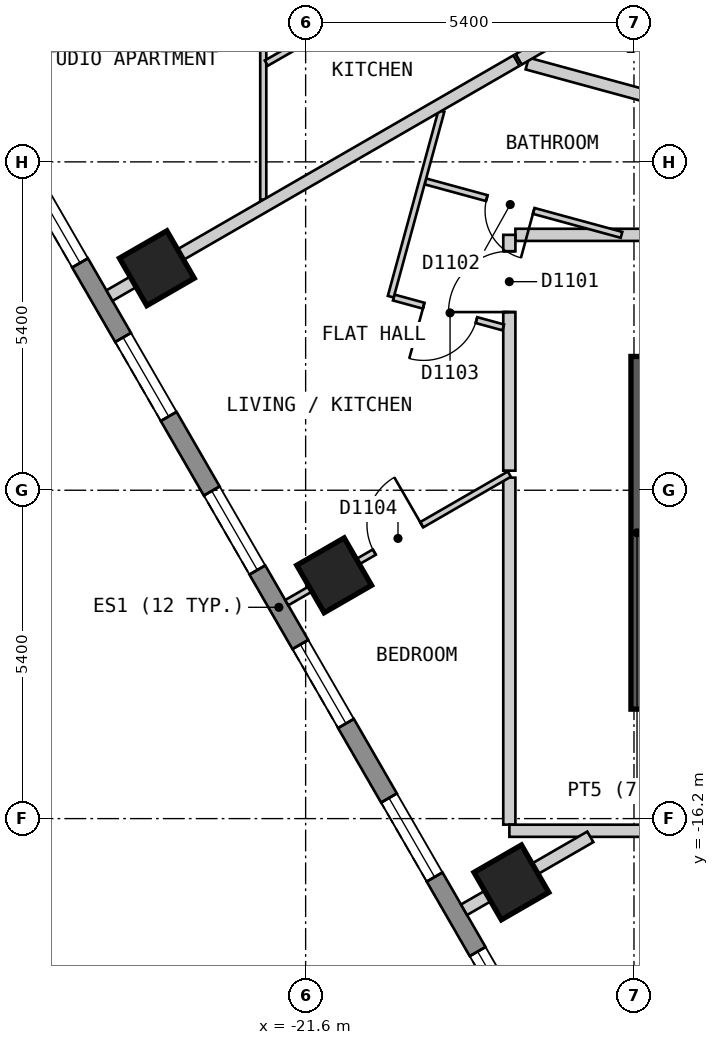
"""IFC4 building model, lengths in metres.
Left out: names, types, materials, properties, quantities, classifications, styles, units other than length and angle.
Written with IfcOpenShell. Run it as: python <this file> out.ifc"""

import sys

from ifc_helpers import new_model, si_unit, direction, frame, frame_2d, origin, origin_2d, place, context, subcontext, project, spatial, polyline, rectangle, outline, extrude, element, fill, save


model = new_model("IFC4")
c1 = context("Model", 3, precision=1e-05, world=origin(), true_north=direction((0.0, 1.0)))
c2 = subcontext(c1, "Body", "Model", "MODEL_VIEW")
j1 = project(units=[si_unit("LENGTHUNIT", "METRE"), si_unit("PLANEANGLEUNIT", "RADIAN")], contexts=[c1])
p1 = place(None, origin())
s1 = spatial("IfcSite", under=j1, at=p1, CompositionType="ELEMENT")
p2 = place(p1, origin())
s2 = spatial("IfcBuilding", under=s1, at=p2, CompositionType="ELEMENT")
p3 = place(p2, frame((0.0, 0.0, 150.6)))
s3 = spatial("IfcBuildingStorey", under=s2, at=p3, CompositionType="ELEMENT", Elevation=150.6)
for number, where, z_axis, x_axis in (
    (1, (-24.047, -7.149, 0.0), (0.0, 0.0, 1.0), (0.5, -0.866, 0.0)),
    (2, (-21.131, -12.199, 0.0), (0.0, 0.0, 1.0), (0.5, -0.866, 0.0)),
    (3, (-18.216, -17.249, 0.0), (0.0, 0.0, 1.0), (0.5, -0.866, 0.0)),
):
    element("IfcColumn", number, at=place(p3, frame(where, z_axis=z_axis, x_axis=x_axis)), inside=s3, PredefinedType="COLUMN", context=c2, shape_type="SweptSolid", body=[
        extrude(rectangle(XDim=0.9, YDim=0.9, at=origin_2d()), origin(), (0.0, 0.0, 1.0), 3.0),
    ])
p4 = place(p3, frame((-28.218, -2.025, 0.0), z_axis=(0.0, 0.0, 1.0), x_axis=(0.500017503135, -0.866015298109, 0.0)))
e4 = element("IfcWall", 4, at=p4, inside=s3, PredefinedType="SOLIDWALL", context=c2, shape_type="SweptSolid", body=[
    extrude(outline(polyline([(0.0, -0.15), (24.711, -0.15), (24.631, 0.15), (0.08, 0.15), (0.0, -0.15)])), origin(), (0.0, 0.0, 1.0), 2.6),
])
p5 = place(p4, frame((1.4, 0.0, 0.15)))
e5 = element("IfcOpeningElement", 5, at=p5, cuts=e4, PredefinedType="OPENING", context=c2, shape_type="SweptSolid", body=[
    extrude(rectangle(XDim=1.5, YDim=2.1, at=frame_2d((0.75, 1.05))), frame((0.0, 0.16, 0.0), z_axis=(0.0, -1.0, 0.0), x_axis=(1.0, 0.0, 0.0)), (0.0, 0.0, 1.0), 0.32),
])
p6 = place(p4, frame((4.316, 0.0, 0.15)))
e6 = element("IfcOpeningElement", 6, at=p6, cuts=e4, PredefinedType="OPENING", context=c2, shape_type="SweptSolid", body=[
    extrude(rectangle(XDim=1.5, YDim=2.1, at=frame_2d((0.75, 1.05))), frame((0.0, 0.16, 0.0), z_axis=(0.0, -1.0, 0.0), x_axis=(1.0, 0.0, 0.0)), (0.0, 0.0, 1.0), 0.32),
])
p7 = place(p4, frame((7.231, 0.0, 0.15)))
e7 = element("IfcOpeningElement", 7, at=p7, cuts=e4, PredefinedType="OPENING", context=c2, shape_type="SweptSolid", body=[
    extrude(rectangle(XDim=1.5, YDim=2.1, at=frame_2d((0.75, 1.05))), frame((0.0, 0.16, 0.0), z_axis=(0.0, -1.0, 0.0), x_axis=(1.0, 0.0, 0.0)), (0.0, 0.0, 1.0), 0.32),
])
p8 = place(p4, frame((10.147, 0.0, 0.15)))
e8 = element("IfcOpeningElement", 8, at=p8, cuts=e4, PredefinedType="OPENING", context=c2, shape_type="SweptSolid", body=[
    extrude(rectangle(XDim=1.5, YDim=2.1, at=frame_2d((0.75, 1.05))), frame((0.0, 0.16, 0.0), z_axis=(0.0, -1.0, 0.0), x_axis=(1.0, 0.0, 0.0)), (0.0, 0.0, 1.0), 0.32),
])
p9 = place(p4, frame((13.062, 0.0, 0.15)))
e9 = element("IfcOpeningElement", 9, at=p9, cuts=e4, PredefinedType="OPENING", context=c2, shape_type="SweptSolid", body=[
    extrude(rectangle(XDim=1.5, YDim=2.1, at=frame_2d((0.75, 1.05))), frame((0.0, 0.16, 0.0), z_axis=(0.0, -1.0, 0.0), x_axis=(1.0, 0.0, 0.0)), (0.0, 0.0, 1.0), 0.32),
])
p10 = place(p4, frame((15.977, 0.0, 0.15)))
e10 = element("IfcOpeningElement", 10, at=p10, cuts=e4, PredefinedType="OPENING", context=c2, shape_type="SweptSolid", body=[
    extrude(rectangle(XDim=1.5, YDim=2.1, at=frame_2d((0.75, 1.05))), frame((0.0, 0.16, 0.0), z_axis=(0.0, -1.0, 0.0), x_axis=(1.0, 0.0, 0.0)), (0.0, 0.0, 1.0), 0.32),
])
p11 = place(p4, frame((18.893, 0.0, 0.15)))
e11 = element("IfcOpeningElement", 11, at=p11, cuts=e4, PredefinedType="OPENING", context=c2, shape_type="SweptSolid", body=[
    extrude(rectangle(XDim=1.5, YDim=2.1, at=frame_2d((0.75, 1.05))), frame((0.0, 0.16, 0.0), z_axis=(0.0, -1.0, 0.0), x_axis=(1.0, 0.0, 0.0)), (0.0, 0.0, 1.0), 0.32),
])
p12 = place(p4, frame((21.809, 0.0, 0.15)))
e12 = element("IfcOpeningElement", 12, at=p12, cuts=e4, PredefinedType="OPENING", context=c2, shape_type="SweptSolid", body=[
    extrude(rectangle(XDim=1.5, YDim=2.1, at=frame_2d((0.75, 1.05))), frame((0.0, 0.16, 0.0), z_axis=(0.0, -1.0, 0.0), x_axis=(1.0, 0.0, 0.0)), (0.0, 0.0, 1.0), 0.32),
])
p13 = place(p3, frame((-18.25, -10.593, 0.0), z_axis=(0.0, 0.0, 1.0), x_axis=(0.0, -1.0, 0.0)))
e13 = element("IfcWall", 13, at=p13, inside=s3, PredefinedType="PARTITIONING", context=c2, shape_type="SweptSolid", body=[
    extrude(rectangle(XDim=5.706, YDim=0.2, at=frame_2d((2.853, 0.0))), origin(), (0.0, 0.0, 1.0), 2.6),
])
p14 = place(p3, frame((-18.15, -6.6, 0.0), z_axis=(0.0, 0.0, 1.0), x_axis=(1.0, 0.0, 0.0)))
e14 = element("IfcWall", 14, at=p14, inside=s3, PredefinedType="PARTITIONING", context=c2, shape_type="SweptSolid", body=[
    extrude(rectangle(XDim=2.55, YDim=0.2, at=frame_2d((1.275, 0.0))), origin(), (0.0, 0.0, 1.0), 2.6),
])
p15 = place(p3, frame((-18.249, -16.4, 0.0), z_axis=(0.0, 0.0, 1.0), x_axis=(1.0, 0.0, 0.0)))
e15 = element("IfcWall", 15, at=p15, inside=s3, PredefinedType="PARTITIONING", context=c2, shape_type="SweptSolid", body=[
    extrude(rectangle(XDim=2.749, YDim=0.2, at=frame_2d((1.375, 0.0))), origin(), (0.0, 0.0, 1.0), 2.6),
])
p16 = place(p3, frame((-18.25, -10.478, 0.0), z_axis=(0.0, 0.0, 1.0), x_axis=(0.0, 1.0, 0.0)))
e16 = element("IfcWall", 16, at=p16, inside=s3, PredefinedType="PARTITIONING", context=c2, shape_type="SweptSolid", body=[
    extrude(rectangle(XDim=3.878, YDim=0.2, at=frame_2d((1.939, 0.0))), origin(), (0.0, 0.0, 1.0), 2.6),
])
p17 = place(p16, frame((2.608, 0.0, 0.0)))
e17 = element("IfcOpeningElement", 17, at=p17, cuts=e16, PredefinedType="OPENING", context=c2, shape_type="SweptSolid", body=[
    extrude(rectangle(XDim=1.0, YDim=2.1, at=frame_2d((0.5, 1.05))), frame((0.0, 0.11, 0.0), z_axis=(0.0, -1.0, 0.0), x_axis=(1.0, 0.0, 0.0)), (0.0, 0.0, 1.0), 0.22),
])
p18 = place(p3, frame((-19.631, -5.721, 0.0), z_axis=(0.0, 0.0, 1.0), x_axis=(0.964816035809, -0.262925877475, 0.0)))
e18 = element("IfcWall", 18, at=p18, inside=s3, PredefinedType="PARTITIONING", context=c2, shape_type="SweptSolid", body=[
    extrude(rectangle(XDim=3.344, YDim=0.1, at=frame_2d((1.672, 0.0))), origin(), (0.0, 0.0, 1.0), 2.6),
])
p19 = place(p18, frame((1.047, 0.0, 0.0)))
e19 = element("IfcOpeningElement", 19, at=p19, cuts=e18, PredefinedType="OPENING", context=c2, shape_type="SweptSolid", body=[
    extrude(rectangle(XDim=0.8, YDim=2.1, at=frame_2d((0.4, 1.05))), frame((0.0, 0.06, 0.0), z_axis=(0.0, -1.0, 0.0), x_axis=(1.0, 0.0, 0.0)), (0.0, 0.0, 1.0), 0.12),
])
p20 = place(p3, frame((-20.151, -7.631, 0.0), z_axis=(0.0, 0.0, 1.0), x_axis=(0.964784947449, -0.263039930765, 0.0)))
e20 = element("IfcWall", 20, at=p20, inside=s3, PredefinedType="PARTITIONING", context=c2, shape_type="SweptSolid", body=[
    extrude(rectangle(XDim=1.866, YDim=0.1, at=frame_2d((0.933, 0.0))), origin(), (0.0, 0.0, 1.0), 2.6),
])
p21 = place(p20, frame((0.51, 0.0, 0.0)))
e21 = element("IfcOpeningElement", 21, at=p21, cuts=e20, PredefinedType="OPENING", context=c2, shape_type="SweptSolid", body=[
    extrude(rectangle(XDim=0.9, YDim=2.1, at=frame_2d((0.45, 1.05))), frame((0.0, 0.06, 0.0), z_axis=(0.0, -1.0, 0.0), x_axis=(1.0, 0.0, 0.0)), (0.0, 0.0, 1.0), 0.12),
])
p22 = place(p3, frame((-20.2, -7.617, 0.0), z_axis=(0.0, 0.0, 1.0), x_axis=(0.263150035392, 0.964754921663, 0.0)))
e22 = element("IfcWall", 22, at=p22, inside=s3, PredefinedType="PARTITIONING", context=c2, shape_type="SweptSolid", body=[
    extrude(rectangle(XDim=3.166, YDim=0.1, at=frame_2d((1.583, 0.0))), origin(), (0.0, 0.0, 1.0), 2.6),
])
p23 = place(p3, frame((-22.297, -6.023, 0.0), z_axis=(0.0, 0.0, 1.0), x_axis=(0.0, 1.0, 0.0)))
e23 = element("IfcWall", 23, at=p23, inside=s3, PredefinedType="PARTITIONING", context=c2, shape_type="SweptSolid", body=[
    extrude(rectangle(XDim=3.47, YDim=0.1, at=frame_2d((1.735, 0.0))), origin(), (0.0, 0.0, 1.0), 2.6),
])
p24 = place(p3, frame((-21.911, -12.649, 0.0), z_axis=(0.0, 0.0, 1.0), x_axis=(0.865984571374, 0.500070717141, 0.0)))
e24 = element("IfcWall", 24, at=p24, inside=s3, PredefinedType="PARTITIONING", context=c2, shape_type="SweptSolid", body=[
    extrude(rectangle(XDim=4.228, YDim=0.1, at=frame_2d((2.114, 0.0))), origin(), (0.0, 0.0, 1.0), 2.6),
])
p25 = place(p24, frame((1.663, 0.0, 0.0)))
e25 = element("IfcOpeningElement", 25, at=p25, cuts=e24, PredefinedType="OPENING", context=c2, shape_type="SweptSolid", body=[
    extrude(rectangle(XDim=0.9, YDim=2.1, at=frame_2d((0.45, 1.05))), frame((0.0, 0.06, 0.0), z_axis=(0.0, -1.0, 0.0), x_axis=(1.0, 0.0, 0.0)), (0.0, 0.0, 1.0), 0.12),
])
p26 = place(p3, frame((-22.247, -3.776, 0.0), z_axis=(0.0, 0.0, 1.0), x_axis=(0.867243093247, 0.497884943752, 0.0)))
e26 = element("IfcWall", 26, at=p26, inside=s3, PredefinedType="PARTITIONING", context=c2, shape_type="SweptSolid", body=[
    extrude(rectangle(XDim=5.854, YDim=0.1, at=frame_2d((2.927, 0.0))), origin(), (0.0, 0.0, 1.0), 2.6),
])
p27 = place(p26, frame((2.498, 0.0, 0.0)))
e27 = element("IfcOpeningElement", 27, at=p27, cuts=e26, PredefinedType="OPENING", context=c2, shape_type="SweptSolid", body=[
    extrude(rectangle(XDim=0.9, YDim=2.1, at=frame_2d((0.45, 1.05))), frame((0.0, 0.06, 0.0), z_axis=(0.0, -1.0, 0.0), x_axis=(1.0, 0.0, 0.0)), (0.0, 0.0, 1.0), 0.12),
])
p28 = place(p3, frame((-17.956, -3.783, 0.0), z_axis=(0.0, 0.0, 1.0), x_axis=(0.964815336827, -0.2629284424, 0.0)))
e28 = element("IfcWall", 28, at=p28, inside=s3, PredefinedType="PARTITIONING", context=c2, shape_type="SweptSolid", body=[
    extrude(rectangle(XDim=2.514, YDim=0.2, at=frame_2d((1.257, 0.0))), origin(), (0.0, 0.0, 1.0), 2.6),
])
p29 = place(p3, frame((-18.995, -17.699, 0.0), z_axis=(0.0, 0.0, 1.0), x_axis=(0.86607371389, 0.499916315105, 0.0)))
e29 = element("IfcWall", 29, at=p29, inside=s3, PredefinedType="PARTITIONING", context=c2, shape_type="SweptSolid", body=[
    extrude(rectangle(XDim=2.398, YDim=0.2, at=frame_2d((1.199, 0.0))), origin(), (0.0, 0.0, 1.0), 2.6),
])
p30 = place(p3, frame((-24.826, -7.599, 0.0), z_axis=(0.0, 0.0, 1.0), x_axis=(0.866031973572, 0.499988620622, 0.0)))
e30 = element("IfcWall", 30, at=p30, inside=s3, PredefinedType="PARTITIONING", context=c2, shape_type="SweptSolid", body=[
    extrude(rectangle(XDim=7.728, YDim=0.2, at=frame_2d((3.864, 0.0))), origin(), (0.0, 0.0, 1.0), 2.6),
])
p31 = place(p3, frame((-18.096, -3.714, 0.0), z_axis=(0.0, 0.0, 1.0), x_axis=(0.865794513859, 0.500399700011, 0.0)))
e31 = element("IfcWall", 31, at=p31, inside=s3, PredefinedType="PARTITIONING", context=c2, shape_type="SweptSolid", body=[
    extrude(rectangle(XDim=2.298, YDim=0.2, at=frame_2d((1.149, 0.0))), origin(), (0.0, 0.0, 1.0), 2.6),
])
p32 = place(p3, frame((-16.15, -14.4, 0.0), z_axis=(0.0, 0.0, 1.0), x_axis=(0.0, 1.0, 0.0)))
e32 = element("IfcWall", 32, at=p32, inside=s3, PredefinedType="SOLIDWALL", context=c2, shape_type="SweptSolid", body=[
    extrude(rectangle(XDim=5.8, YDim=0.2, at=frame_2d((2.9, 0.0))), origin(), (0.0, 0.0, 1.0), 2.6),
])
p33 = place(p6, origin())
e33 = element("IfcWindow", 33, at=p33, inside=s3, PartitioningType="SINGLE_PANEL", PredefinedType="WINDOW", context=c2, shape_type="SweptSolid", body=[
    extrude(rectangle(XDim=1.5, YDim=2.1, at=frame_2d((0.75, 1.05))), frame((0.0, 0.03, 0.0), z_axis=(0.0, -1.0, 0.0), x_axis=(1.0, 0.0, 0.0)), (0.0, 0.0, 1.0), 0.06),
])
fill(e6, e33)
p34 = place(p7, origin())
e34 = element("IfcWindow", 34, at=p34, inside=s3, PartitioningType="SINGLE_PANEL", PredefinedType="WINDOW", context=c2, shape_type="SweptSolid", body=[
    extrude(rectangle(XDim=1.5, YDim=2.1, at=frame_2d((0.75, 1.05))), frame((0.0, 0.03, 0.0), z_axis=(0.0, -1.0, 0.0), x_axis=(1.0, 0.0, 0.0)), (0.0, 0.0, 1.0), 0.06),
])
fill(e7, e34)
p35 = place(p8, origin())
e35 = element("IfcWindow", 35, at=p35, inside=s3, PartitioningType="SINGLE_PANEL", PredefinedType="WINDOW", context=c2, shape_type="SweptSolid", body=[
    extrude(rectangle(XDim=1.5, YDim=2.1, at=frame_2d((0.75, 1.05))), frame((0.0, 0.03, 0.0), z_axis=(0.0, -1.0, 0.0), x_axis=(1.0, 0.0, 0.0)), (0.0, 0.0, 1.0), 0.06),
])
fill(e8, e35)
p36 = place(p9, origin())
e36 = element("IfcWindow", 36, at=p36, inside=s3, PartitioningType="SINGLE_PANEL", PredefinedType="WINDOW", context=c2, shape_type="SweptSolid", body=[
    extrude(rectangle(XDim=1.5, YDim=2.1, at=frame_2d((0.75, 1.05))), frame((0.0, 0.03, 0.0), z_axis=(0.0, -1.0, 0.0), x_axis=(1.0, 0.0, 0.0)), (0.0, 0.0, 1.0), 0.06),
])
fill(e9, e36)
p37 = place(p10, origin())
e37 = element("IfcWindow", 37, at=p37, inside=s3, PartitioningType="SINGLE_PANEL", PredefinedType="WINDOW", context=c2, shape_type="SweptSolid", body=[
    extrude(rectangle(XDim=1.5, YDim=2.1, at=frame_2d((0.75, 1.05))), frame((0.0, 0.03, 0.0), z_axis=(0.0, -1.0, 0.0), x_axis=(1.0, 0.0, 0.0)), (0.0, 0.0, 1.0), 0.06),
])
fill(e10, e37)
p38 = place(p11, origin())
e38 = element("IfcWindow", 38, at=p38, inside=s3, PartitioningType="SINGLE_PANEL", PredefinedType="WINDOW", context=c2, shape_type="SweptSolid", body=[
    extrude(rectangle(XDim=1.5, YDim=2.1, at=frame_2d((0.75, 1.05))), frame((0.0, 0.03, 0.0), z_axis=(0.0, -1.0, 0.0), x_axis=(1.0, 0.0, 0.0)), (0.0, 0.0, 1.0), 0.06),
])
fill(e11, e38)
p39 = place(p17, origin())
e39 = element("IfcDoor", 39, at=p39, inside=s3, OperationType="SINGLE_SWING_LEFT", PredefinedType="DOOR", context=c2, shape_type="SweptSolid", body=[
    extrude(rectangle(XDim=1.0, YDim=2.1, at=frame_2d((0.5, 1.05))), frame((0.0, 0.025, 0.0), z_axis=(0.0, -1.0, 0.0), x_axis=(1.0, 0.0, 0.0)), (0.0, 0.0, 1.0), 0.05),
])
fill(e17, e39)
p40 = place(p19, origin())
e40 = element("IfcDoor", 40, at=p40, inside=s3, OperationType="SINGLE_SWING_RIGHT", PredefinedType="DOOR", context=c2, shape_type="SweptSolid", body=[
    extrude(rectangle(XDim=0.8, YDim=2.1, at=frame_2d((0.4, 1.05))), frame((0.0, 0.025, 0.0), z_axis=(0.0, -1.0, 0.0), x_axis=(1.0, 0.0, 0.0)), (0.0, 0.0, 1.0), 0.05),
])
fill(e19, e40)
p41 = place(p21, origin())
e41 = element("IfcDoor", 41, at=p41, inside=s3, OperationType="SINGLE_SWING_LEFT", PredefinedType="DOOR", context=c2, shape_type="SweptSolid", body=[
    extrude(rectangle(XDim=0.9, YDim=2.1, at=frame_2d((0.45, 1.05))), frame((0.0, 0.025, 0.0), z_axis=(0.0, -1.0, 0.0), x_axis=(1.0, 0.0, 0.0)), (0.0, 0.0, 1.0), 0.05),
])
fill(e21, e41)
p42 = place(p25, origin())
e42 = element("IfcDoor", 42, at=p42, inside=s3, OperationType="SINGLE_SWING_RIGHT", PredefinedType="DOOR", context=c2, shape_type="SweptSolid", body=[
    extrude(rectangle(XDim=0.9, YDim=2.1, at=frame_2d((0.45, 1.05))), frame((0.0, 0.025, 0.0), z_axis=(0.0, -1.0, 0.0), x_axis=(1.0, 0.0, 0.0)), (0.0, 0.0, 1.0), 0.05),
])
fill(e25, e42)
save(model, sys.argv[1])
